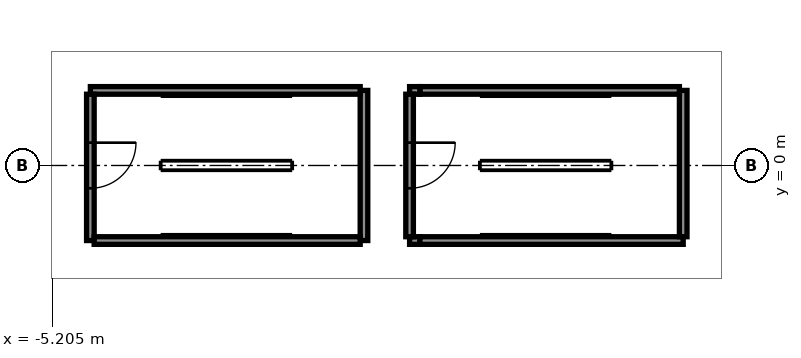
"""IFC4 building model, lengths in metres.
Left out: names, types, materials, properties, quantities, classifications, styles, units other than length and angle.
Written with IfcOpenShell. Run it as: python <this file> out.ifc"""

import sys

from ifc_helpers import new_model, si_unit, direction, frame, frame_2d, origin, place, context, subcontext, project, spatial, rectangle, extrude, element, fill, save


model = new_model("IFC4")
c1 = context("Model", 3, precision=1e-05, world=origin(), true_north=direction((0.0, 1.0)))
c2 = subcontext(c1, "Body", "Model", "MODEL_VIEW")
j1 = project(units=[si_unit("LENGTHUNIT", "METRE"), si_unit("PLANEANGLEUNIT", "RADIAN")], contexts=[c1])
p1 = place(None, origin())
s1 = spatial("IfcSite", under=j1, at=p1, CompositionType="ELEMENT")
p2 = place(p1, origin())
s2 = spatial("IfcBuilding", under=s1, at=p2, CompositionType="ELEMENT")
p3 = place(p2, frame((0.0, 0.0, 12.0)))
s3 = spatial("IfcBuildingStorey", under=s2, at=p3, CompositionType="ELEMENT", Elevation=12.0)
p4 = place(p3, frame((4.2, -1.975, 0.0), z_axis=(0.0, 0.0, 1.0), x_axis=(1.0, 0.0, 0.0)))
e1 = element("IfcWall", 1, at=p4, inside=s3, PredefinedType="SOLIDWALL", context=c2, shape_type="SweptSolid", body=[
    extrude(rectangle(XDim=0.27, YDim=0.2, at=frame_2d((0.135, 0.0))), origin(), (0.0, 0.0, 1.0), 2.68),
])
p5 = place(p3, frame((4.47, -1.975, 0.0), z_axis=(0.0, 0.0, 1.0), x_axis=(1.0, 0.0, 0.0)))
e2 = element("IfcWall", 2, at=p5, inside=s3, PredefinedType="SOLIDWALL", context=c2, shape_type="SweptSolid", body=[
    extrude(rectangle(XDim=6.93, YDim=0.2, at=frame_2d((3.465, 0.0))), origin(), (0.0, 0.0, 1.0), 4.2),
])
p6 = place(p3, frame((11.4, -1.875, 0.0), z_axis=(0.0, 0.0, 1.0), x_axis=(0.0, 1.0, 0.0)))
e3 = element("IfcWall", 3, at=p6, inside=s3, PredefinedType="SOLIDWALL", context=c2, shape_type="SweptSolid", body=[
    extrude(rectangle(XDim=3.85, YDim=0.2, at=frame_2d((1.925, 0.0))), origin(), (0.0, 0.0, 1.0), 4.2),
])
p7 = place(p3, frame((11.3, 1.975, 0.0), z_axis=(0.0, 0.0, 1.0), x_axis=(-1.0, 0.0, 0.0)))
e4 = element("IfcWall", 4, at=p7, inside=s3, PredefinedType="SOLIDWALL", context=c2, shape_type="SweptSolid", body=[
    extrude(rectangle(XDim=6.83, YDim=0.2, at=frame_2d((3.415, 0.0))), origin(), (0.0, 0.0, 1.0), 4.2),
])
p8 = place(p3, frame((4.47, 1.975, 0.0), z_axis=(0.0, 0.0, 1.0), x_axis=(-1.0, 0.0, 0.0)))
e5 = element("IfcWall", 5, at=p8, inside=s3, PredefinedType="SOLIDWALL", context=c2, shape_type="SweptSolid", body=[
    extrude(rectangle(XDim=0.27, YDim=0.2, at=frame_2d((0.135, 0.0))), origin(), (0.0, 0.0, 1.0), 2.68),
])
p9 = place(p3, frame((4.2, 1.875, 0.0), z_axis=(0.0, 0.0, 1.0), x_axis=(0.0, -1.0, 0.0)))
e6 = element("IfcWall", 6, at=p9, inside=s3, PredefinedType="SOLIDWALL", context=c2, shape_type="SweptSolid", body=[
    extrude(rectangle(XDim=3.75, YDim=0.2, at=frame_2d((1.875, 0.0))), origin(), (0.0, 0.0, 1.0), 2.68),
])
p10 = place(p9, frame((1.275, 0.0, 0.0)))
e7 = element("IfcOpeningElement", 7, at=p10, cuts=e6, PredefinedType="OPENING", context=c2, shape_type="SweptSolid", body=[
    extrude(rectangle(XDim=1.2, YDim=2.1, at=frame_2d((0.6, 1.05))), frame((0.0, 0.11, 0.0), z_axis=(0.0, -1.0, 0.0), x_axis=(1.0, 0.0, 0.0)), (0.0, 0.0, 1.0), 0.22),
])
p11 = place(p3, frame((3.0, -1.975, 0.0), z_axis=(0.0, 0.0, 1.0), x_axis=(0.0, 1.0, 0.0)))
e8 = element("IfcWall", 8, at=p11, inside=s3, PredefinedType="SOLIDWALL", context=c2, shape_type="SweptSolid", body=[
    extrude(rectangle(XDim=3.95, YDim=0.2, at=frame_2d((1.975, 0.0))), origin(), (0.0, 0.0, 1.0), 4.2),
])
p12 = place(p3, frame((2.9, 1.975, 0.0), z_axis=(0.0, 0.0, 1.0), x_axis=(-1.0, 0.0, 0.0)))
e9 = element("IfcWall", 9, at=p12, inside=s3, PredefinedType="SOLIDWALL", context=c2, shape_type="SweptSolid", body=[
    extrude(rectangle(XDim=7.1, YDim=0.2, at=frame_2d((3.55, 0.0))), origin(), (0.0, 0.0, 1.0), 4.2),
])
p13 = place(p3, frame((-4.2, 1.875, 0.0), z_axis=(0.0, 0.0, 1.0), x_axis=(0.0, -1.0, 0.0)))
e10 = element("IfcWall", 10, at=p13, inside=s3, PredefinedType="SOLIDWALL", context=c2, shape_type="SweptSolid", body=[
    extrude(rectangle(XDim=3.85, YDim=0.2, at=frame_2d((1.925, 0.0))), origin(), (0.0, 0.0, 1.0), 4.2),
])
p14 = place(p13, frame((1.275, 0.0, 0.0)))
e11 = element("IfcOpeningElement", 11, at=p14, cuts=e10, PredefinedType="OPENING", context=c2, shape_type="SweptSolid", body=[
    extrude(rectangle(XDim=1.2, YDim=2.1, at=frame_2d((0.6, 1.05))), frame((0.0, 0.11, 0.0), z_axis=(0.0, -1.0, 0.0), x_axis=(1.0, 0.0, 0.0)), (0.0, 0.0, 1.0), 0.22),
])
p15 = place(p3, frame((-4.1, -1.975, 0.0), z_axis=(0.0, 0.0, 1.0), x_axis=(1.0, 0.0, 0.0)))
e12 = element("IfcWall", 12, at=p15, inside=s3, PredefinedType="SOLIDWALL", context=c2, shape_type="SweptSolid", body=[
    extrude(rectangle(XDim=7.0, YDim=0.2, at=frame_2d((3.5, 0.0))), origin(), (0.0, 0.0, 1.0), 4.2),
])
p16 = place(p10, frame((1.2, 0.0, 0.0), z_axis=(0.0, 0.0, 1.0), x_axis=(-1.0, 0.0, 0.0)))
e13 = element("IfcDoor", 13, at=p16, inside=s3, OperationType="SINGLE_SWING_LEFT", PredefinedType="DOOR", context=c2, shape_type="SweptSolid", body=[
    extrude(rectangle(XDim=1.2, YDim=2.1, at=frame_2d((0.6, 1.05))), frame((0.0, 0.025, 0.0), z_axis=(0.0, -1.0, 0.0), x_axis=(1.0, 0.0, 0.0)), (0.0, 0.0, 1.0), 0.05),
])
fill(e7, e13)
p17 = place(p14, frame((1.2, 0.0, 0.0), z_axis=(0.0, 0.0, 1.0), x_axis=(-1.0, 0.0, 0.0)))
e14 = element("IfcDoor", 14, at=p17, inside=s3, OperationType="SINGLE_SWING_LEFT", PredefinedType="DOOR", context=c2, shape_type="SweptSolid", body=[
    extrude(rectangle(XDim=1.2, YDim=2.1, at=frame_2d((0.6, 1.05))), frame((0.0, 0.025, 0.0), z_axis=(0.0, -1.0, 0.0), x_axis=(1.0, 0.0, 0.0)), (0.0, 0.0, 1.0), 0.05),
])
fill(e11, e14)
save(model, sys.argv[1])
